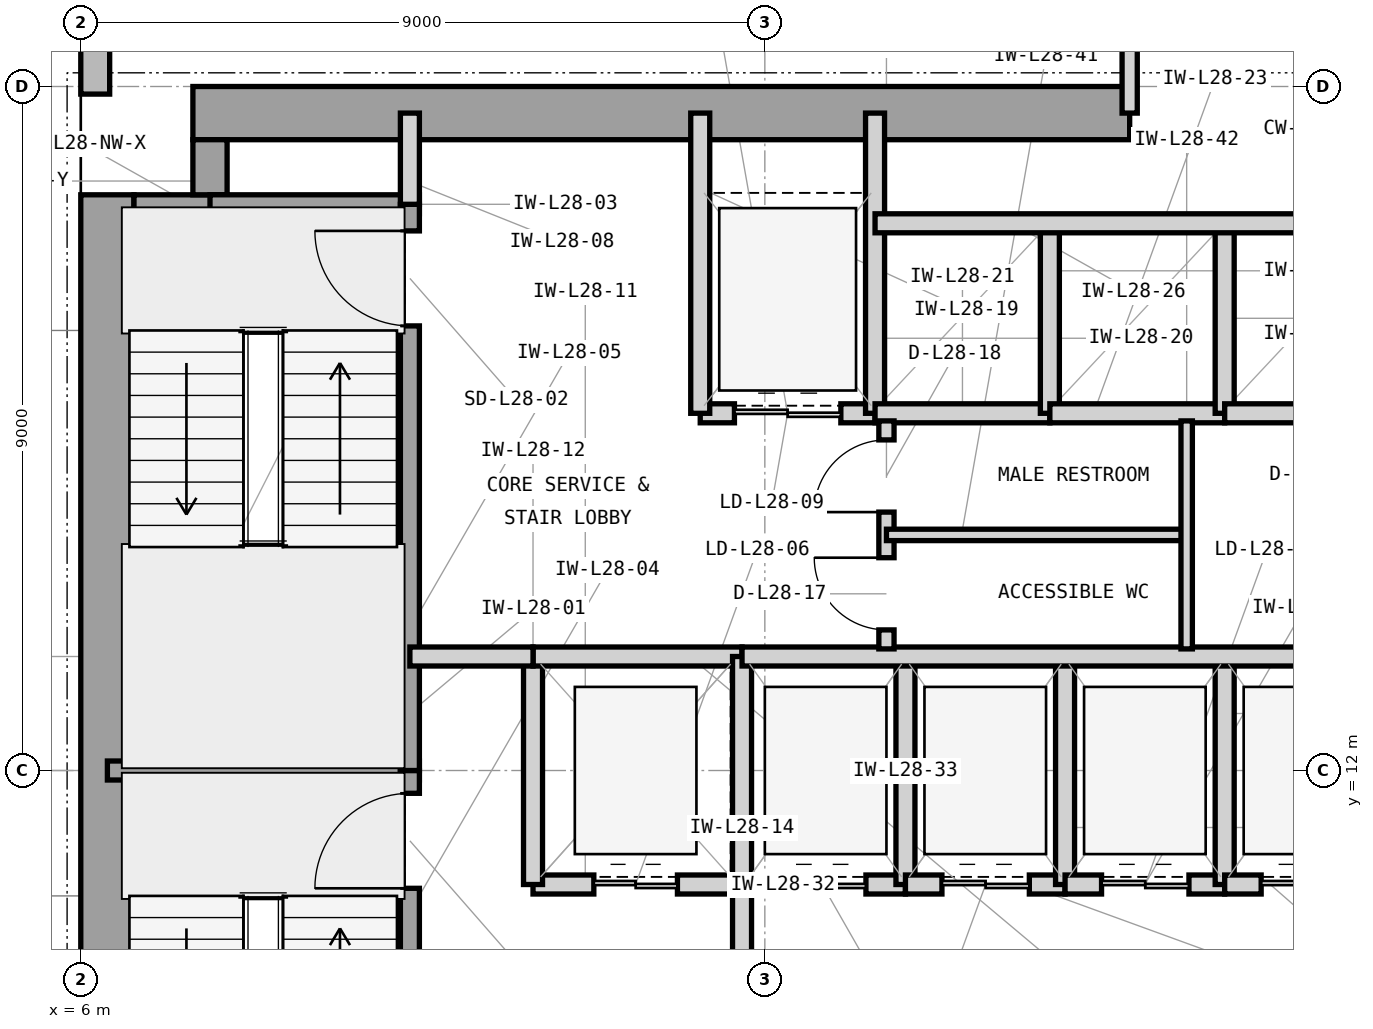
"""IFC4 building model, lengths in metres.
Left out: names, types, materials, properties, quantities, classifications, styles, units other than length and angle.
Written with IfcOpenShell. Run it as: python <this file> out.ifc"""

import sys

from ifc_helpers import new_model, si_unit, direction, frame, frame_2d, origin, place, context, subcontext, project, spatial, rectangle, extrude, element, fill, save


model = new_model("IFC4")
c1 = context("Model", 3, precision=1e-05, world=origin(), true_north=direction((0.0, 1.0)))
c2 = subcontext(c1, "Body", "Model", "MODEL_VIEW")
j1 = project(units=[si_unit("LENGTHUNIT", "METRE"), si_unit("PLANEANGLEUNIT", "RADIAN")], contexts=[c1])
p1 = place(None, origin())
s1 = spatial("IfcSite", under=j1, at=p1, CompositionType="ELEMENT")
p2 = place(p1, origin())
s2 = spatial("IfcBuilding", under=s1, at=p2, CompositionType="ELEMENT")
p3 = place(p2, frame((0.0, 0.0, 120.6)))
s3 = spatial("IfcBuildingStorey", under=s2, at=p3, CompositionType="ELEMENT", Elevation=120.6)
p4 = place(p3, frame((6.35, 4.425, 0.0), z_axis=(0.0, 0.0, 1.0), x_axis=(0.0, 1.0, 0.0)))
e1 = element("IfcWall", 1, at=p4, inside=s3, PredefinedType="SHEAR", context=c2, shape_type="SweptSolid", body=[
    extrude(rectangle(XDim=15.15, YDim=0.7, at=frame_2d((7.575, 0.0))), origin(), (0.0, 0.0, 1.0), 3.9),
])
p5 = place(p3, frame((7.475, 20.65, 0.0), z_axis=(0.0, 0.0, 1.0), x_axis=(1.0, 0.0, 0.0)))
e2 = element("IfcWall", 2, at=p5, inside=s3, PredefinedType="SHEAR", context=c2, shape_type="SweptSolid", body=[
    extrude(rectangle(XDim=12.325, YDim=0.7, at=frame_2d((6.163, 0.0))), origin(), (0.0, 0.0, 1.0), 3.9),
])
p6 = place(p3, frame((6.7, 19.35, 0.0), z_axis=(0.0, 0.0, 1.0), x_axis=(1.0, 0.0, 0.0)))
e3 = element("IfcWall", 3, at=p6, inside=s3, PredefinedType="SHEAR", context=c2, shape_type="SweptSolid", body=[
    extrude(rectangle(XDim=1.225, YDim=0.45, at=frame_2d((0.613, 0.0))), origin(), (0.0, 0.0, 1.0), 3.9),
])
p7 = place(p3, frame((7.7, 19.575, 0.0), z_axis=(0.0, 0.0, 1.0), x_axis=(0.0, 1.0, 0.0)))
e4 = element("IfcWall", 4, at=p7, inside=s3, PredefinedType="SHEAR", context=c2, shape_type="SweptSolid", body=[
    extrude(rectangle(XDim=0.725, YDim=0.45, at=frame_2d((0.363, 0.0))), origin(), (0.0, 0.0, 1.0), 3.9),
])
p8 = place(p3, frame((6.19, 46.4, 0.0), z_axis=(0.0, 0.0, 1.0), x_axis=(0.0, -1.0, 0.0)))
e5 = element("IfcWall", 5, at=p8, inside=s3, PredefinedType="STANDARD", context=c2, shape_type="SweptSolid", body=[
    extrude(rectangle(XDim=25.5, YDim=0.38, at=frame_2d((12.75, 0.0))), origin(), (0.0, 0.0, 1.0), 3.7),
])
p9 = place(p8, frame((11.5, 0.0, 0.85)))
e6 = element("IfcOpeningElement", 6, at=p9, cuts=e5, PredefinedType="OPENING", context=c2, shape_type="SweptSolid", body=[
    extrude(rectangle(XDim=2.5, YDim=2.25, at=frame_2d((1.25, 1.125))), frame((0.0, 0.2, 0.0), z_axis=(0.0, -1.0, 0.0), x_axis=(1.0, 0.0, 0.0)), (0.0, 0.0, 1.0), 0.4),
])
p10 = place(p8, frame((8.254, 0.0, 0.85)))
e7 = element("IfcOpeningElement", 7, at=p10, cuts=e5, PredefinedType="OPENING", context=c2, shape_type="SweptSolid", body=[
    extrude(rectangle(XDim=1.2, YDim=2.25, at=frame_2d((0.6, 1.125))), frame((0.0, 0.2, 0.0), z_axis=(0.0, -1.0, 0.0), x_axis=(1.0, 0.0, 0.0)), (0.0, 0.0, 1.0), 0.4),
])
p11 = place(p3, frame((6.35, 12.0, 0.0), z_axis=(0.0, 0.0, 1.0), x_axis=(1.0, 0.0, 0.0)))
e8 = element("IfcWall", 8, at=p11, inside=s3, PredefinedType="SHEAR", context=c2, shape_type="SweptSolid", body=[
    extrude(rectangle(XDim=4.105, YDim=0.25, at=frame_2d((2.052, 0.0))), origin(), (0.0, 0.0, 1.0), 3.9),
])
p12 = place(p3, frame((7.7, 19.45, 0.0), z_axis=(0.0, 0.0, 1.0), x_axis=(1.0, 0.0, 0.0)))
e9 = element("IfcWall", 9, at=p12, inside=s3, PredefinedType="SHEAR", context=c2, shape_type="SweptSolid", body=[
    extrude(rectangle(XDim=2.755, YDim=0.25, at=frame_2d((1.377, 0.0))), origin(), (0.0, 0.0, 1.0), 3.9),
])
p13 = place(p3, frame((10.33, 4.55, 0.0), z_axis=(0.0, 0.0, 1.0), x_axis=(0.0, 1.0, 0.0)))
e10 = element("IfcWall", 10, at=p13, inside=s3, PredefinedType="SHEAR", context=c2, shape_type="SweptSolid", body=[
    extrude(rectangle(XDim=7.45, YDim=0.25, at=frame_2d((3.725, 0.0))), origin(), (0.0, 0.0, 1.0), 3.9),
])
p14 = place(p13, frame((5.9, 0.0, 0.0)))
e11 = element("IfcOpeningElement", 11, at=p14, cuts=e10, PredefinedType="OPENING", context=c2, shape_type="SweptSolid", body=[
    extrude(rectangle(XDim=1.25, YDim=2.2, at=frame_2d((0.625, 1.1))), frame((0.0, 0.135, 0.0), z_axis=(0.0, -1.0, 0.0), x_axis=(1.0, 0.0, 0.0)), (0.0, 0.0, 1.0), 0.27),
])
p15 = place(p3, frame((10.33, 12.0, 0.0), z_axis=(0.0, 0.0, 1.0), x_axis=(0.0, 1.0, 0.0)))
e12 = element("IfcWall", 12, at=p15, inside=s3, PredefinedType="SHEAR", context=c2, shape_type="SweptSolid", body=[
    extrude(rectangle(XDim=7.45, YDim=0.25, at=frame_2d((3.725, 0.0))), origin(), (0.0, 0.0, 1.0), 3.9),
])
p16 = place(p15, frame((5.85, 0.0, 0.0)))
e13 = element("IfcOpeningElement", 13, at=p16, cuts=e12, PredefinedType="OPENING", context=c2, shape_type="SweptSolid", body=[
    extrude(rectangle(XDim=1.25, YDim=2.2, at=frame_2d((0.625, 1.1))), frame((0.0, 0.135, 0.0), z_axis=(0.0, -1.0, 0.0), x_axis=(1.0, 0.0, 0.0)), (0.0, 0.0, 1.0), 0.27),
])
p17 = place(p3, frame((10.33, 19.45, 0.0), z_axis=(0.0, 0.0, 1.0), x_axis=(0.0, 1.0, 0.0)))
e14 = element("IfcWall", 14, at=p17, inside=s3, PredefinedType="PARTITIONING", context=c2, shape_type="SweptSolid", body=[
    extrude(rectangle(XDim=1.2, YDim=0.25, at=frame_2d((0.6, 0.0))), origin(), (0.0, 0.0, 1.0), 2.917),
])
p18 = place(p3, frame((11.95, 10.5, 0.0), z_axis=(0.0, 0.0, 1.0), x_axis=(1.0, 0.0, 0.0)))
e15 = element("IfcWall", 15, at=p18, inside=s3, PredefinedType="PARTITIONING", context=c2, shape_type="SweptSolid", body=[
    extrude(rectangle(XDim=2.75, YDim=0.25, at=frame_2d((1.375, 0.0))), origin(), (0.0, 0.0, 1.0), 3.227),
])
p19 = place(p18, frame((0.8, 0.0, 0.0)))
e16 = element("IfcOpeningElement", 16, at=p19, cuts=e15, PredefinedType="OPENING", context=c2, shape_type="SweptSolid", body=[
    extrude(rectangle(XDim=1.1, YDim=2.25, at=frame_2d((0.55, 1.125))), frame((0.0, 0.135, 0.0), z_axis=(0.0, -1.0, 0.0), x_axis=(1.0, 0.0, 0.0)), (0.0, 0.0, 1.0), 0.27),
])
p20 = place(p3, frame((11.95, 10.5, 0.0), z_axis=(0.0, 0.0, 1.0), x_axis=(0.0, 1.0, 0.0)))
e17 = element("IfcWall", 17, at=p20, inside=s3, PredefinedType="PARTITIONING", context=c2, shape_type="SweptSolid", body=[
    extrude(rectangle(XDim=3.0, YDim=0.25, at=frame_2d((1.5, 0.0))), origin(), (0.0, 0.0, 1.0), 3.69),
])
p21 = place(p3, frame((11.95, 13.5, 0.0), z_axis=(0.0, 0.0, 1.0), x_axis=(1.0, 0.0, 0.0)))
e18 = element("IfcWall", 18, at=p21, inside=s3, PredefinedType="PARTITIONING", context=c2, shape_type="SweptSolid", body=[
    extrude(rectangle(XDim=2.75, YDim=0.25, at=frame_2d((1.375, 0.0))), origin(), (0.0, 0.0, 1.0), 3.227),
])
p22 = place(p3, frame((14.7, 10.5, 0.0), z_axis=(0.0, 0.0, 1.0), x_axis=(0.0, 1.0, 0.0)))
e19 = element("IfcWall", 19, at=p22, inside=s3, PredefinedType="PARTITIONING", context=c2, shape_type="SweptSolid", body=[
    extrude(rectangle(XDim=3.0, YDim=0.25, at=frame_2d((1.5, 0.0))), origin(), (0.0, 0.0, 1.0), 3.69),
])
p23 = place(p3, frame((14.7, 6.7, 0.0), z_axis=(0.0, 0.0, 1.0), x_axis=(0.0, 1.0, 0.0)))
e20 = element("IfcWall", 20, at=p23, inside=s3, PredefinedType="PARTITIONING", context=c2, shape_type="SweptSolid", body=[
    extrude(rectangle(XDim=3.8, YDim=0.25, at=frame_2d((1.9, 0.0))), origin(), (0.0, 0.0, 1.0), 3.69),
])
p24 = place(p23, frame((1.3, 0.0, 0.0)))
e21 = element("IfcOpeningElement", 21, at=p24, cuts=e20, PredefinedType="OPENING", context=c2, shape_type="SweptSolid", body=[
    extrude(rectangle(XDim=1.2, YDim=2.2, at=frame_2d((0.6, 1.1))), frame((0.0, 0.135, 0.0), z_axis=(0.0, -1.0, 0.0), x_axis=(1.0, 0.0, 0.0)), (0.0, 0.0, 1.0), 0.27),
])
p25 = place(p3, frame((10.33, 13.5, 0.0), z_axis=(0.0, 0.0, 1.0), x_axis=(1.0, 0.0, 0.0)))
e22 = element("IfcWall", 22, at=p25, inside=s3, PredefinedType="PARTITIONING", context=c2, shape_type="SweptSolid", body=[
    extrude(rectangle(XDim=1.62, YDim=0.25, at=frame_2d((0.81, 0.0))), origin(), (0.0, 0.0, 1.0), 3.227),
])
p26 = place(p3, frame((14.15, 16.7, 0.0), z_axis=(0.0, 0.0, 1.0), x_axis=(1.0, 0.0, 0.0)))
e23 = element("IfcWall", 23, at=p26, inside=s3, PredefinedType="PARTITIONING", context=c2, shape_type="SweptSolid", body=[
    extrude(rectangle(XDim=2.3, YDim=0.25, at=frame_2d((1.15, 0.0))), origin(), (0.0, 0.0, 1.0), 3.227),
])
p27 = place(p26, frame((0.45, 0.0, 0.0)))
e24 = element("IfcOpeningElement", 24, at=p27, cuts=e23, PredefinedType="OPENING", context=c2, shape_type="SweptSolid", body=[
    extrude(rectangle(XDim=1.4, YDim=2.35, at=frame_2d((0.7, 1.175))), frame((0.0, 0.135, 0.0), z_axis=(0.0, -1.0, 0.0), x_axis=(1.0, 0.0, 0.0)), (0.0, 0.0, 1.0), 0.27),
])
for number, where, z_axis, x_axis in (
    (25, (14.15, 16.7, 0.0), (0.0, 0.0, 1.0), (0.0, 1.0, 0.0)),
    (26, (16.45, 16.7, 0.0), (0.0, 0.0, 1.0), (0.0, 1.0, 0.0)),
):
    element("IfcWall", number, at=place(p3, frame(where, z_axis=z_axis, x_axis=x_axis)), inside=s3, PredefinedType="PARTITIONING", context=c2, shape_type="SweptSolid", body=[
        extrude(rectangle(XDim=3.95, YDim=0.25, at=frame_2d((1.975, 0.0))), origin(), (0.0, 0.0, 1.0), 3.69),
    ])
p28 = place(p3, frame((16.45, 16.7, 0.0), z_axis=(0.0, 0.0, 1.0), x_axis=(1.0, 0.0, 0.0)))
e27 = element("IfcWall", 27, at=p28, inside=s3, PredefinedType="PARTITIONING", context=c2, shape_type="SweptSolid", body=[
    extrude(rectangle(XDim=2.3, YDim=0.25, at=frame_2d((1.15, 0.0))), origin(), (0.0, 0.0, 1.0), 3.227),
])
p29 = place(p3, frame((18.75, 16.7, 0.0), z_axis=(0.0, 0.0, 1.0), x_axis=(0.0, 1.0, 0.0)))
e28 = element("IfcWall", 28, at=p29, inside=s3, PredefinedType="PARTITIONING", context=c2, shape_type="SweptSolid", body=[
    extrude(rectangle(XDim=2.5, YDim=0.25, at=frame_2d((1.25, 0.0))), origin(), (0.0, 0.0, 1.0), 3.69),
])
p30 = place(p3, frame((18.75, 16.7, 0.0), z_axis=(0.0, 0.0, 1.0), x_axis=(1.0, 0.0, 0.0)))
e29 = element("IfcWall", 29, at=p30, inside=s3, PredefinedType="PARTITIONING", context=c2, shape_type="SweptSolid", body=[
    extrude(rectangle(XDim=2.3, YDim=0.25, at=frame_2d((1.15, 0.0))), origin(), (0.0, 0.0, 1.0), 3.227),
])
p31 = place(p3, frame((21.05, 16.7, 0.0), z_axis=(0.0, 0.0, 1.0), x_axis=(0.0, 1.0, 0.0)))
e30 = element("IfcWall", 30, at=p31, inside=s3, PredefinedType="PARTITIONING", context=c2, shape_type="SweptSolid", body=[
    extrude(rectangle(XDim=2.5, YDim=0.25, at=frame_2d((1.25, 0.0))), origin(), (0.0, 0.0, 1.0), 3.69),
])
p32 = place(p3, frame((21.05, 16.7, 0.0), z_axis=(0.0, 0.0, 1.0), x_axis=(1.0, 0.0, 0.0)))
e31 = element("IfcWall", 31, at=p32, inside=s3, PredefinedType="PARTITIONING", context=c2, shape_type="SweptSolid", body=[
    extrude(rectangle(XDim=2.4, YDim=0.25, at=frame_2d((1.2, 0.0))), origin(), (0.0, 0.0, 1.0), 3.227),
])
p33 = place(p3, frame((16.45, 19.2, 0.0), z_axis=(0.0, 0.0, 1.0), x_axis=(1.0, 0.0, 0.0)))
e32 = element("IfcWall", 32, at=p33, inside=s3, PredefinedType="PARTITIONING", context=c2, shape_type="SweptSolid", body=[
    extrude(rectangle(XDim=7.2, YDim=0.25, at=frame_2d((3.6, 0.0))), origin(), (0.0, 0.0, 1.0), 3.69),
])
p34 = place(p3, frame((14.7, 10.5, 0.0), z_axis=(0.0, 0.0, 1.0), x_axis=(1.0, 0.0, 0.0)))
e33 = element("IfcWall", 33, at=p34, inside=s3, PredefinedType="PARTITIONING", context=c2, shape_type="SweptSolid", body=[
    extrude(rectangle(XDim=2.15, YDim=0.25, at=frame_2d((1.075, 0.0))), origin(), (0.0, 0.0, 1.0), 3.227),
])
p35 = place(p34, frame((0.48, 0.0, 0.0)))
e34 = element("IfcOpeningElement", 34, at=p35, cuts=e33, PredefinedType="OPENING", context=c2, shape_type="SweptSolid", body=[
    extrude(rectangle(XDim=1.15, YDim=2.25, at=frame_2d((0.575, 1.125))), frame((0.0, 0.135, 0.0), z_axis=(0.0, -1.0, 0.0), x_axis=(1.0, 0.0, 0.0)), (0.0, 0.0, 1.0), 0.27),
])
p36 = place(p3, frame((16.85, 10.5, 0.0), z_axis=(0.0, 0.0, 1.0), x_axis=(0.0, 1.0, 0.0)))
e35 = element("IfcWall", 35, at=p36, inside=s3, PredefinedType="PARTITIONING", context=c2, shape_type="SweptSolid", body=[
    extrude(rectangle(XDim=3.0, YDim=0.25, at=frame_2d((1.5, 0.0))), origin(), (0.0, 0.0, 1.0), 3.69),
])
p37 = place(p3, frame((16.85, 10.5, 0.0), z_axis=(0.0, 0.0, 1.0), x_axis=(1.0, 0.0, 0.0)))
e36 = element("IfcWall", 36, at=p37, inside=s3, PredefinedType="PARTITIONING", context=c2, shape_type="SweptSolid", body=[
    extrude(rectangle(XDim=2.1, YDim=0.25, at=frame_2d((1.05, 0.0))), origin(), (0.0, 0.0, 1.0), 3.227),
])
p38 = place(p37, frame((0.48, 0.0, 0.0)))
e37 = element("IfcOpeningElement", 37, at=p38, cuts=e36, PredefinedType="OPENING", context=c2, shape_type="SweptSolid", body=[
    extrude(rectangle(XDim=1.15, YDim=2.25, at=frame_2d((0.575, 1.125))), frame((0.0, 0.135, 0.0), z_axis=(0.0, -1.0, 0.0), x_axis=(1.0, 0.0, 0.0)), (0.0, 0.0, 1.0), 0.27),
])
p39 = place(p3, frame((18.95, 10.5, 0.0), z_axis=(0.0, 0.0, 1.0), x_axis=(0.0, 1.0, 0.0)))
e38 = element("IfcWall", 38, at=p39, inside=s3, PredefinedType="PARTITIONING", context=c2, shape_type="SweptSolid", body=[
    extrude(rectangle(XDim=3.0, YDim=0.25, at=frame_2d((1.5, 0.0))), origin(), (0.0, 0.0, 1.0), 3.69),
])
p40 = place(p3, frame((18.95, 10.5, 0.0), z_axis=(0.0, 0.0, 1.0), x_axis=(1.0, 0.0, 0.0)))
e39 = element("IfcWall", 39, at=p40, inside=s3, PredefinedType="PARTITIONING", context=c2, shape_type="SweptSolid", body=[
    extrude(rectangle(XDim=2.1, YDim=0.25, at=frame_2d((1.05, 0.0))), origin(), (0.0, 0.0, 1.0), 3.227),
])
p41 = place(p40, frame((0.48, 0.0, 0.0)))
e40 = element("IfcOpeningElement", 40, at=p41, cuts=e39, PredefinedType="OPENING", context=c2, shape_type="SweptSolid", body=[
    extrude(rectangle(XDim=1.15, YDim=2.25, at=frame_2d((0.575, 1.125))), frame((0.0, 0.135, 0.0), z_axis=(0.0, -1.0, 0.0), x_axis=(1.0, 0.0, 0.0)), (0.0, 0.0, 1.0), 0.27),
])
p42 = place(p3, frame((21.05, 10.5, 0.0), z_axis=(0.0, 0.0, 1.0), x_axis=(0.0, 1.0, 0.0)))
e41 = element("IfcWall", 41, at=p42, inside=s3, PredefinedType="PARTITIONING", context=c2, shape_type="SweptSolid", body=[
    extrude(rectangle(XDim=3.0, YDim=0.25, at=frame_2d((1.5, 0.0))), origin(), (0.0, 0.0, 1.0), 3.69),
])
p43 = place(p3, frame((21.05, 10.5, 0.0), z_axis=(0.0, 0.0, 1.0), x_axis=(1.0, 0.0, 0.0)))
e42 = element("IfcWall", 42, at=p43, inside=s3, PredefinedType="PARTITIONING", context=c2, shape_type="SweptSolid", body=[
    extrude(rectangle(XDim=2.4, YDim=0.25, at=frame_2d((1.2, 0.0))), origin(), (0.0, 0.0, 1.0), 3.227),
])
p44 = place(p43, frame((0.48, 0.0, 0.0)))
e43 = element("IfcOpeningElement", 43, at=p44, cuts=e42, PredefinedType="OPENING", context=c2, shape_type="SweptSolid", body=[
    extrude(rectangle(XDim=1.15, YDim=2.25, at=frame_2d((0.575, 1.125))), frame((0.0, 0.135, 0.0), z_axis=(0.0, -1.0, 0.0), x_axis=(1.0, 0.0, 0.0)), (0.0, 0.0, 1.0), 0.27),
])
p45 = place(p3, frame((14.7, 13.5, 0.0), z_axis=(0.0, 0.0, 1.0), x_axis=(1.0, 0.0, 0.0)))
e44 = element("IfcWall", 44, at=p45, inside=s3, PredefinedType="PARTITIONING", context=c2, shape_type="SweptSolid", body=[
    extrude(rectangle(XDim=8.95, YDim=0.25, at=frame_2d((4.475, 0.0))), origin(), (0.0, 0.0, 1.0), 3.227),
])
p46 = place(p3, frame((16.6, 13.6, 0.0), z_axis=(0.0, 0.0, 1.0), x_axis=(0.0, 1.0, 0.0)))
e45 = element("IfcWall", 45, at=p46, inside=s3, PredefinedType="PARTITIONING", context=c2, shape_type="SweptSolid", body=[
    extrude(rectangle(XDim=3.0, YDim=0.2, at=frame_2d((1.5, 0.0))), origin(), (0.0, 0.0, 1.0), 3.69),
])
p47 = place(p46, frame((0.25, 0.0, 0.0)))
e46 = element("IfcOpeningElement", 46, at=p47, cuts=e45, PredefinedType="OPENING", context=c2, shape_type="SweptSolid", body=[
    extrude(rectangle(XDim=0.95, YDim=2.1, at=frame_2d((0.475, 1.05))), frame((0.0, 0.11, 0.0), z_axis=(0.0, -1.0, 0.0), x_axis=(1.0, 0.0, 0.0)), (0.0, 0.0, 1.0), 0.22),
])
p48 = place(p46, frame((1.8, 0.0, 0.0)))
e47 = element("IfcOpeningElement", 47, at=p48, cuts=e45, PredefinedType="OPENING", context=c2, shape_type="SweptSolid", body=[
    extrude(rectangle(XDim=0.95, YDim=2.1, at=frame_2d((0.475, 1.05))), frame((0.0, 0.11, 0.0), z_axis=(0.0, -1.0, 0.0), x_axis=(1.0, 0.0, 0.0)), (0.0, 0.0, 1.0), 0.22),
])
p49 = place(p3, frame((16.6, 15.1, 0.0), z_axis=(0.0, 0.0, 1.0), x_axis=(1.0, 0.0, 0.0)))
e48 = element("IfcWall", 48, at=p49, inside=s3, PredefinedType="PARTITIONING", context=c2, shape_type="SweptSolid", body=[
    extrude(rectangle(XDim=3.95, YDim=0.15, at=frame_2d((1.975, 0.0))), origin(), (0.0, 0.0, 1.0), 3.69),
])
p50 = place(p3, frame((20.55, 13.6, 0.0), z_axis=(0.0, 0.0, 1.0), x_axis=(0.0, 1.0, 0.0)))
e49 = element("IfcWall", 49, at=p50, inside=s3, PredefinedType="PARTITIONING", context=c2, shape_type="SweptSolid", body=[
    extrude(rectangle(XDim=3.0, YDim=0.15, at=frame_2d((1.5, 0.0))), origin(), (0.0, 0.0, 1.0), 3.69),
])
p51 = place(p3, frame((19.8, 20.65, 0.0), z_axis=(0.0, 0.0, 1.0), x_axis=(0.0, 1.0, 0.0)))
e50 = element("IfcWall", 50, at=p51, inside=s3, PredefinedType="PARTITIONING", context=c2, shape_type="SweptSolid", body=[
    extrude(rectangle(XDim=6.15, YDim=0.2, at=frame_2d((3.075, 0.0))), origin(), (0.0, 0.0, 1.0), 3.69),
])
p52 = place(p14, origin())
e51 = element("IfcDoor", 51, at=p52, inside=s3, OperationType="SINGLE_SWING_LEFT", PredefinedType="DOOR", context=c2, shape_type="SweptSolid", body=[
    extrude(rectangle(XDim=1.25, YDim=2.2, at=frame_2d((0.625, 1.1))), frame((0.0, 0.025, 0.0), z_axis=(0.0, -1.0, 0.0), x_axis=(1.0, 0.0, 0.0)), (0.0, 0.0, 1.0), 0.05),
])
fill(e11, e51)
p53 = place(p16, origin())
e52 = element("IfcDoor", 52, at=p53, inside=s3, OperationType="SINGLE_SWING_RIGHT", PredefinedType="DOOR", context=c2, shape_type="SweptSolid", body=[
    extrude(rectangle(XDim=1.25, YDim=2.2, at=frame_2d((0.625, 1.1))), frame((0.0, 0.025, 0.0), z_axis=(0.0, -1.0, 0.0), x_axis=(1.0, 0.0, 0.0)), (0.0, 0.0, 1.0), 0.05),
])
fill(e13, e52)
p54 = place(p19, origin())
e53 = element("IfcDoor", 53, at=p54, inside=s3, OperationType="DOUBLE_DOOR_SLIDING", PredefinedType="DOOR", context=c2, shape_type="SweptSolid", body=[
    extrude(rectangle(XDim=1.1, YDim=2.25, at=frame_2d((0.55, 1.125))), frame((0.0, 0.025, 0.0), z_axis=(0.0, -1.0, 0.0), x_axis=(1.0, 0.0, 0.0)), (0.0, 0.0, 1.0), 0.05),
])
fill(e16, e53)
p55 = place(p27, origin())
e54 = element("IfcDoor", 54, at=p55, inside=s3, OperationType="DOUBLE_DOOR_SLIDING", PredefinedType="DOOR", context=c2, shape_type="SweptSolid", body=[
    extrude(rectangle(XDim=1.4, YDim=2.35, at=frame_2d((0.7, 1.175))), frame((0.0, 0.025, 0.0), z_axis=(0.0, -1.0, 0.0), x_axis=(1.0, 0.0, 0.0)), (0.0, 0.0, 1.0), 0.05),
])
fill(e24, e54)
p56 = place(p35, origin())
e55 = element("IfcDoor", 55, at=p56, inside=s3, OperationType="DOUBLE_DOOR_SLIDING", PredefinedType="DOOR", context=c2, shape_type="SweptSolid", body=[
    extrude(rectangle(XDim=1.15, YDim=2.25, at=frame_2d((0.575, 1.125))), frame((0.0, 0.025, 0.0), z_axis=(0.0, -1.0, 0.0), x_axis=(1.0, 0.0, 0.0)), (0.0, 0.0, 1.0), 0.05),
])
fill(e34, e55)
p57 = place(p38, origin())
e56 = element("IfcDoor", 56, at=p57, inside=s3, OperationType="DOUBLE_DOOR_SLIDING", PredefinedType="DOOR", context=c2, shape_type="SweptSolid", body=[
    extrude(rectangle(XDim=1.15, YDim=2.25, at=frame_2d((0.575, 1.125))), frame((0.0, 0.025, 0.0), z_axis=(0.0, -1.0, 0.0), x_axis=(1.0, 0.0, 0.0)), (0.0, 0.0, 1.0), 0.05),
])
fill(e37, e56)
p58 = place(p41, origin())
e57 = element("IfcDoor", 57, at=p58, inside=s3, OperationType="DOUBLE_DOOR_SLIDING", PredefinedType="DOOR", context=c2, shape_type="SweptSolid", body=[
    extrude(rectangle(XDim=1.15, YDim=2.25, at=frame_2d((0.575, 1.125))), frame((0.0, 0.025, 0.0), z_axis=(0.0, -1.0, 0.0), x_axis=(1.0, 0.0, 0.0)), (0.0, 0.0, 1.0), 0.05),
])
fill(e40, e57)
p59 = place(p44, origin())
e58 = element("IfcDoor", 58, at=p59, inside=s3, OperationType="DOUBLE_DOOR_SLIDING", PredefinedType="DOOR", context=c2, shape_type="SweptSolid", body=[
    extrude(rectangle(XDim=1.15, YDim=2.25, at=frame_2d((0.575, 1.125))), frame((0.0, 0.025, 0.0), z_axis=(0.0, -1.0, 0.0), x_axis=(1.0, 0.0, 0.0)), (0.0, 0.0, 1.0), 0.05),
])
fill(e43, e58)
p60 = place(p47, origin())
e59 = element("IfcDoor", 59, at=p60, inside=s3, OperationType="SINGLE_SWING_RIGHT", PredefinedType="DOOR", context=c2, shape_type="SweptSolid", body=[
    extrude(rectangle(XDim=0.95, YDim=2.1, at=frame_2d((0.475, 1.05))), frame((0.0, 0.025, 0.0), z_axis=(0.0, -1.0, 0.0), x_axis=(1.0, 0.0, 0.0)), (0.0, 0.0, 1.0), 0.05),
])
fill(e46, e59)
p61 = place(p48, origin())
e60 = element("IfcDoor", 60, at=p61, inside=s3, OperationType="SINGLE_SWING_LEFT", PredefinedType="DOOR", context=c2, shape_type="SweptSolid", body=[
    extrude(rectangle(XDim=0.95, YDim=2.1, at=frame_2d((0.475, 1.05))), frame((0.0, 0.025, 0.0), z_axis=(0.0, -1.0, 0.0), x_axis=(1.0, 0.0, 0.0)), (0.0, 0.0, 1.0), 0.05),
])
fill(e47, e60)
save(model, sys.argv[1])
